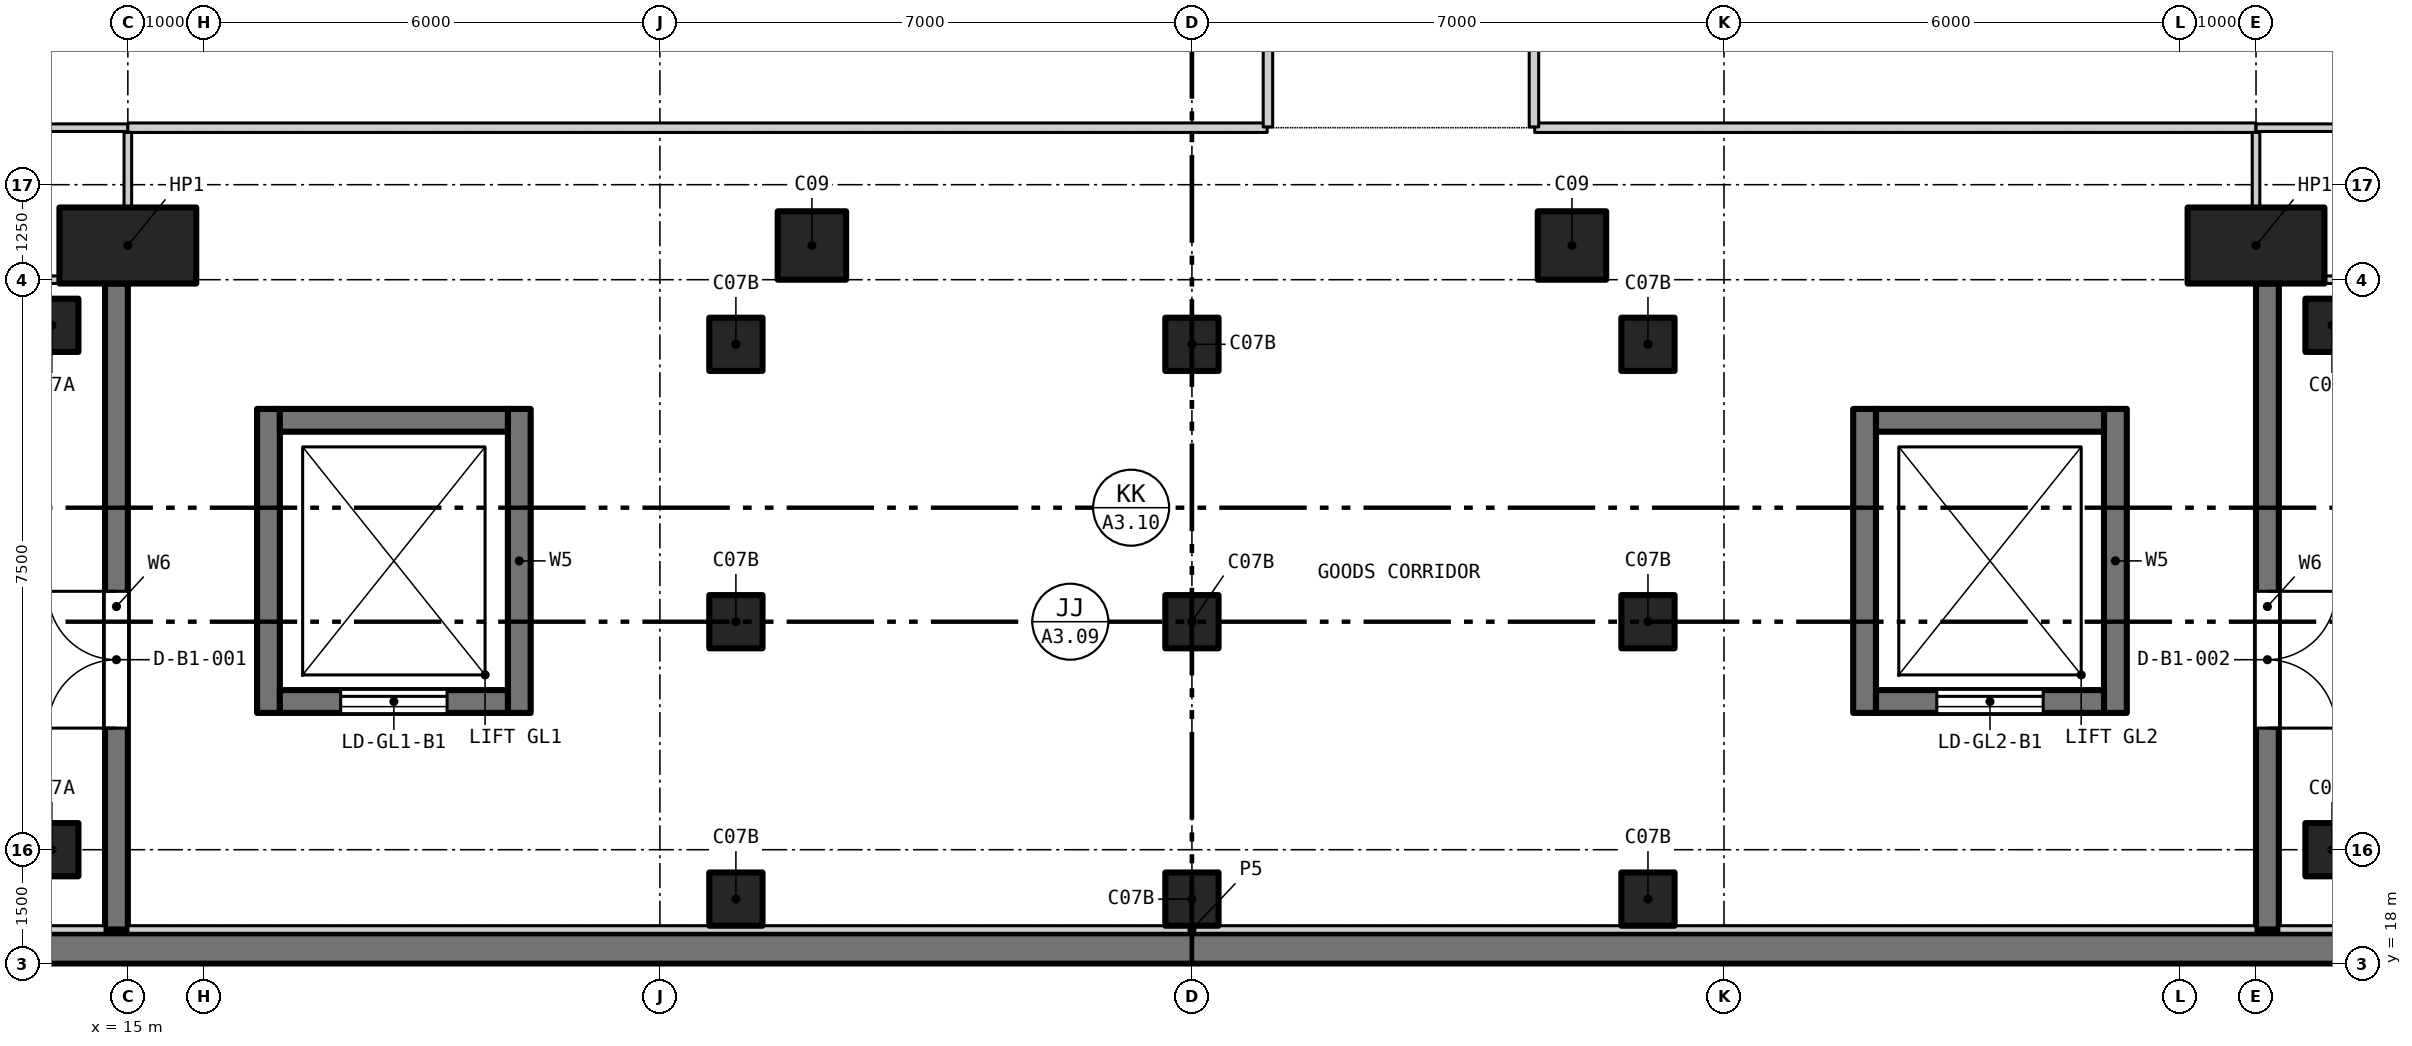
"""IFC4 building model, lengths in metres.
Left out: names, types, materials, properties, quantities, classifications, styles, units other than length and angle.
Written with IfcOpenShell. Run it as: python <this file> out.ifc"""

import sys

from ifc_helpers import new_model, si_unit, direction, frame, frame_2d, origin, origin_2d, place, context, subcontext, project, spatial, rectangle, extrude, element, fill, save


model = new_model("IFC4")
c1 = context("Model", 3, precision=1e-05, world=origin(), true_north=direction((0.0, 1.0)))
c2 = subcontext(c1, "Body", "Model", "MODEL_VIEW")
j1 = project(units=[si_unit("LENGTHUNIT", "METRE"), si_unit("PLANEANGLEUNIT", "RADIAN")], contexts=[c1])
p1 = place(None, origin())
s1 = spatial("IfcSite", under=j1, at=p1, CompositionType="ELEMENT")
p2 = place(p1, origin())
s2 = spatial("IfcBuilding", under=s1, at=p2, CompositionType="ELEMENT")
p3 = place(p2, frame((0.0, 0.0, -10.0)))
s3 = spatial("IfcBuildingStorey", under=s2, at=p3, CompositionType="ELEMENT", Elevation=-10.0)
for number, where, z_axis, x_axis in (
    (1, (24.0, 27.45, -1.4), (0.0, 0.0, 1.0), (1.0, 0.0, 0.0)),
    (2, (34.0, 27.45, -1.4), (0.0, 0.0, 1.0), (1.0, 0.0, 0.0)),
):
    element("IfcColumn", number, at=place(p3, frame(where, z_axis=z_axis, x_axis=x_axis)), inside=s3, PredefinedType="COLUMN", context=c2, shape_type="SweptSolid", body=[
        extrude(rectangle(XDim=0.9, YDim=0.9, at=origin_2d()), origin(), (0.0, 0.0, 1.0), 6.4),
    ])
for number, where, z_axis, x_axis in (
    (3, (14.0, 19.5, -1.4), (0.0, 0.0, 1.0), (1.0, 0.0, 0.0)),
    (4, (14.0, 26.4, -1.4), (0.0, 0.0, 1.0), (1.0, 0.0, 0.0)),
    (5, (44.0, 19.5, -1.4), (0.0, 0.0, 1.0), (1.0, 0.0, 0.0)),
    (6, (44.0, 26.4, -1.4), (0.0, 0.0, 1.0), (1.0, 0.0, 0.0)),
    (7, (23.0, 22.5, -1.4), (0.0, 0.0, 1.0), (1.0, 0.0, 0.0)),
    (8, (29.0, 22.5, -1.4), (0.0, 0.0, 1.0), (1.0, 0.0, 0.0)),
    (9, (35.0, 22.5, -1.4), (0.0, 0.0, 1.0), (1.0, 0.0, 0.0)),
    (10, (23.0, 26.15, -1.4), (0.0, 0.0, 1.0), (1.0, 0.0, 0.0)),
    (11, (29.0, 26.15, -1.4), (0.0, 0.0, 1.0), (1.0, 0.0, 0.0)),
    (12, (35.0, 26.15, -1.4), (0.0, 0.0, 1.0), (1.0, 0.0, 0.0)),
    (13, (23.0, 18.85, -1.4), (0.0, 0.0, 1.0), (1.0, 0.0, 0.0)),
    (14, (29.0, 18.85, -1.4), (0.0, 0.0, 1.0), (1.0, 0.0, 0.0)),
    (15, (35.0, 18.85, -1.4), (0.0, 0.0, 1.0), (1.0, 0.0, 0.0)),
):
    element("IfcColumn", number, at=place(p3, frame(where, z_axis=z_axis, x_axis=x_axis)), inside=s3, PredefinedType="COLUMN", context=c2, shape_type="SweptSolid", body=[
        extrude(rectangle(XDim=0.7, YDim=0.7, at=origin_2d()), origin(), (0.0, 0.0, 1.0), 6.4),
    ])
p4 = place(p3, frame((0.4, 18.2, -1.4), z_axis=(0.0, 0.0, 1.0), x_axis=(1.0, 0.0, 0.0)))
e16 = element("IfcWall", 16, at=p4, inside=s3, PredefinedType="SOLIDWALL", context=c2, shape_type="SweptSolid", body=[
    extrude(rectangle(XDim=57.2, YDim=0.4, at=frame_2d((28.6, 0.0))), origin(), (0.0, 0.0, 1.0), 6.4),
])
p5 = place(p3, frame((14.85, 18.45, -1.4), z_axis=(0.0, 0.0, 1.0), x_axis=(0.0, 1.0, 0.0)))
e17 = element("IfcWall", 17, at=p5, inside=s3, PredefinedType="SOLIDWALL", context=c2, shape_type="SweptSolid", body=[
    extrude(rectangle(XDim=8.5, YDim=0.3, at=frame_2d((4.25, 0.0))), origin(), (0.0, 0.0, 1.0), 6.4),
])
p6 = place(p5, frame((2.65, 0.0, 1.4)))
e18 = element("IfcOpeningElement", 18, at=p6, cuts=e17, PredefinedType="OPENING", context=c2, shape_type="SweptSolid", body=[
    extrude(rectangle(XDim=1.8, YDim=2.1, at=frame_2d((0.9, 1.05))), frame((0.0, 0.16, 0.0), z_axis=(0.0, -1.0, 0.0), x_axis=(1.0, 0.0, 0.0)), (0.0, 0.0, 1.0), 0.32),
])
p7 = place(p3, frame((43.15, 18.45, -1.4), z_axis=(0.0, 0.0, 1.0), x_axis=(0.0, 1.0, 0.0)))
e19 = element("IfcWall", 19, at=p7, inside=s3, PredefinedType="SOLIDWALL", context=c2, shape_type="SweptSolid", body=[
    extrude(rectangle(XDim=8.5, YDim=0.3, at=frame_2d((4.25, 0.0))), origin(), (0.0, 0.0, 1.0), 6.4),
])
p8 = place(p7, frame((2.65, 0.0, 1.4)))
e20 = element("IfcOpeningElement", 20, at=p8, cuts=e19, PredefinedType="OPENING", context=c2, shape_type="SweptSolid", body=[
    extrude(rectangle(XDim=1.8, YDim=2.1, at=frame_2d((0.9, 1.05))), frame((0.0, 0.16, 0.0), z_axis=(0.0, -1.0, 0.0), x_axis=(1.0, 0.0, 0.0)), (0.0, 0.0, 1.0), 0.32),
])
for number, where, z_axis, x_axis in (
    (21, (16.85, 21.3, -1.4), (0.0, 0.0, 1.0), (0.0, 1.0, 0.0)),
    (22, (20.15, 21.3, -1.4), (0.0, 0.0, 1.0), (0.0, 1.0, 0.0)),
):
    element("IfcWall", number, at=place(p3, frame(where, z_axis=z_axis, x_axis=x_axis)), inside=s3, PredefinedType="SHEAR", context=c2, shape_type="SweptSolid", body=[
        extrude(rectangle(XDim=4.0, YDim=0.3, at=frame_2d((2.0, 0.0))), origin(), (0.0, 0.0, 1.0), 6.4),
    ])
p9 = place(p3, frame((17.0, 21.45, -1.4), z_axis=(0.0, 0.0, 1.0), x_axis=(1.0, 0.0, 0.0)))
e23 = element("IfcWall", 23, at=p9, inside=s3, PredefinedType="SHEAR", context=c2, shape_type="SweptSolid", body=[
    extrude(rectangle(XDim=3.0, YDim=0.3, at=frame_2d((1.5, 0.0))), origin(), (0.0, 0.0, 1.0), 6.4),
])
p10 = place(p9, frame((0.8, 0.0, 1.4)))
e24 = element("IfcOpeningElement", 24, at=p10, cuts=e23, PredefinedType="OPENING", context=c2, shape_type="SweptSolid", body=[
    extrude(rectangle(XDim=1.4, YDim=2.1, at=frame_2d((0.7, 1.05))), frame((0.0, 0.16, 0.0), z_axis=(0.0, -1.0, 0.0), x_axis=(1.0, 0.0, 0.0)), (0.0, 0.0, 1.0), 0.32),
])
p11 = place(p3, frame((17.0, 25.15, -1.4), z_axis=(0.0, 0.0, 1.0), x_axis=(1.0, 0.0, 0.0)))
e25 = element("IfcWall", 25, at=p11, inside=s3, PredefinedType="SHEAR", context=c2, shape_type="SweptSolid", body=[
    extrude(rectangle(XDim=3.0, YDim=0.3, at=frame_2d((1.5, 0.0))), origin(), (0.0, 0.0, 1.0), 6.4),
])
for number, where, z_axis, x_axis in (
    (26, (37.85, 21.3, -1.4), (0.0, 0.0, 1.0), (0.0, 1.0, 0.0)),
    (27, (41.15, 21.3, -1.4), (0.0, 0.0, 1.0), (0.0, 1.0, 0.0)),
):
    element("IfcWall", number, at=place(p3, frame(where, z_axis=z_axis, x_axis=x_axis)), inside=s3, PredefinedType="SHEAR", context=c2, shape_type="SweptSolid", body=[
        extrude(rectangle(XDim=4.0, YDim=0.3, at=frame_2d((2.0, 0.0))), origin(), (0.0, 0.0, 1.0), 6.4),
    ])
p12 = place(p3, frame((38.0, 21.45, -1.4), z_axis=(0.0, 0.0, 1.0), x_axis=(1.0, 0.0, 0.0)))
e28 = element("IfcWall", 28, at=p12, inside=s3, PredefinedType="SHEAR", context=c2, shape_type="SweptSolid", body=[
    extrude(rectangle(XDim=3.0, YDim=0.3, at=frame_2d((1.5, 0.0))), origin(), (0.0, 0.0, 1.0), 6.4),
])
p13 = place(p12, frame((0.8, 0.0, 1.4)))
e29 = element("IfcOpeningElement", 29, at=p13, cuts=e28, PredefinedType="OPENING", context=c2, shape_type="SweptSolid", body=[
    extrude(rectangle(XDim=1.4, YDim=2.1, at=frame_2d((0.7, 1.05))), frame((0.0, 0.16, 0.0), z_axis=(0.0, -1.0, 0.0), x_axis=(1.0, 0.0, 0.0)), (0.0, 0.0, 1.0), 0.32),
])
p14 = place(p3, frame((38.0, 25.15, -1.4), z_axis=(0.0, 0.0, 1.0), x_axis=(1.0, 0.0, 0.0)))
e30 = element("IfcWall", 30, at=p14, inside=s3, PredefinedType="SHEAR", context=c2, shape_type="SweptSolid", body=[
    extrude(rectangle(XDim=3.0, YDim=0.3, at=frame_2d((1.5, 0.0))), origin(), (0.0, 0.0, 1.0), 6.4),
])
for number, where, z_axis, x_axis in (
    (31, (15.0, 27.45, -1.4), (0.0, 0.0, 1.0), (1.0, 0.0, 0.0)),
    (32, (43.0, 27.45, -1.4), (0.0, 0.0, 1.0), (1.0, 0.0, 0.0)),
):
    element("IfcColumn", number, at=place(p3, frame(where, z_axis=z_axis, x_axis=x_axis)), inside=s3, PredefinedType="COLUMN", context=c2, shape_type="SweptSolid", body=[
        extrude(rectangle(XDim=1.8, YDim=1.0, at=origin_2d()), origin(), (0.0, 0.0, 1.0), 6.4),
    ])
p15 = place(p3, frame((6.61, 18.45, 0.0), z_axis=(0.0, 0.0, 1.0), x_axis=(1.0, 0.0, 0.0)))
e33 = element("IfcWall", 33, at=p15, inside=s3, PredefinedType="PARTITIONING", context=c2, shape_type="SweptSolid", body=[
    extrude(rectangle(XDim=8.09, YDim=0.1, at=frame_2d((4.045, 0.0))), origin(), (0.0, 0.0, 1.0), 4.75),
])
p16 = place(p3, frame((15.0, 18.45, 0.0), z_axis=(0.0, 0.0, 1.0), x_axis=(1.0, 0.0, 0.0)))
e34 = element("IfcWall", 34, at=p16, inside=s3, PredefinedType="PARTITIONING", context=c2, shape_type="SweptSolid", body=[
    extrude(rectangle(XDim=28.0, YDim=0.1, at=frame_2d((14.0, 0.0))), origin(), (0.0, 0.0, 1.0), 4.75),
])
p17 = place(p3, frame((43.3, 18.45, 0.0), z_axis=(0.0, 0.0, 1.0), x_axis=(1.0, 0.0, 0.0)))
e35 = element("IfcWall", 35, at=p17, inside=s3, PredefinedType="PARTITIONING", context=c2, shape_type="SweptSolid", body=[
    extrude(rectangle(XDim=8.11, YDim=0.1, at=frame_2d((4.055, 0.0))), origin(), (0.0, 0.0, 1.0), 4.75),
])
for number, where, z_axis, x_axis in (
    (36, (12.65, 27.0, 0.0), (0.0, 0.0, 1.0), (1.0, 0.0, 0.0)),
    (37, (43.9, 27.0, 0.0), (0.0, 0.0, 1.0), (1.0, 0.0, 0.0)),
):
    element("IfcWall", number, at=place(p3, frame(where, z_axis=z_axis, x_axis=x_axis)), inside=s3, PredefinedType="PARTITIONING", context=c2, shape_type="SweptSolid", body=[
        extrude(rectangle(XDim=1.45, YDim=0.1, at=frame_2d((0.725, 0.0))), origin(), (0.0, 0.0, 1.0), 4.75),
    ])
p18 = place(p3, frame((12.712, 29.0, 0.0), z_axis=(0.0, 0.0, 1.0), x_axis=(1.0, 0.0, 0.0)))
e38 = element("IfcWall", 38, at=p18, inside=s3, PredefinedType="PARTITIONING", context=c2, shape_type="SweptSolid", body=[
    extrude(rectangle(XDim=2.288, YDim=0.1, at=frame_2d((1.144, 0.0))), origin(), (0.0, 0.0, 1.0), 4.75),
])
p19 = place(p3, frame((15.0, 29.0, 0.0), z_axis=(0.0, 0.0, 1.0), x_axis=(1.0, 0.0, 0.0)))
e39 = element("IfcWall", 39, at=p19, inside=s3, PredefinedType="PARTITIONING", context=c2, shape_type="SweptSolid", body=[
    extrude(rectangle(XDim=14.99, YDim=0.125, at=frame_2d((7.495, 0.0))), origin(), (0.0, 0.0, 1.0), 4.75),
])
p20 = place(p3, frame((33.51, 29.0, 0.0), z_axis=(0.0, 0.0, 1.0), x_axis=(1.0, 0.0, 0.0)))
e40 = element("IfcWall", 40, at=p20, inside=s3, PredefinedType="PARTITIONING", context=c2, shape_type="SweptSolid", body=[
    extrude(rectangle(XDim=9.49, YDim=0.125, at=frame_2d((4.745, 0.0))), origin(), (0.0, 0.0, 1.0), 4.75),
])
p21 = place(p3, frame((43.0, 29.0, 0.0), z_axis=(0.0, 0.0, 1.0), x_axis=(1.0, 0.0, 0.0)))
e41 = element("IfcWall", 41, at=p21, inside=s3, PredefinedType="PARTITIONING", context=c2, shape_type="SweptSolid", body=[
    extrude(rectangle(XDim=2.288, YDim=0.1, at=frame_2d((1.144, 0.0))), origin(), (0.0, 0.0, 1.0), 4.75),
])
p22 = place(p3, frame((15.0, 27.95, 0.0), z_axis=(0.0, 0.0, 1.0), x_axis=(0.0, 1.0, 0.0)))
e42 = element("IfcWall", 42, at=p22, inside=s3, PredefinedType="PARTITIONING", context=c2, shape_type="SweptSolid", body=[
    extrude(rectangle(XDim=0.988, YDim=0.1, at=frame_2d((0.494, 0.0))), origin(), (0.0, 0.0, 1.0), 4.75),
])
p23 = place(p3, frame((30.0, 29.01, 0.0), z_axis=(0.0, 0.0, 1.0), x_axis=(0.0, 1.0, 0.0)))
e43 = element("IfcWall", 43, at=p23, inside=s3, PredefinedType="PARTITIONING", context=c2, shape_type="SweptSolid", body=[
    extrude(rectangle(XDim=20.49, YDim=0.125, at=frame_2d((10.245, 0.0))), origin(), (0.0, 0.0, 1.0), 4.75),
])
p24 = place(p23, frame((9.65, 0.0, 0.0)))
e44 = element("IfcOpeningElement", 44, at=p24, cuts=e43, PredefinedType="OPENING", context=c2, shape_type="SweptSolid", body=[
    extrude(rectangle(XDim=1.2, YDim=2.1, at=frame_2d((0.6, 1.05))), frame((0.0, 0.073, 0.0), z_axis=(0.0, -1.0, 0.0), x_axis=(1.0, 0.0, 0.0)), (0.0, 0.0, 1.0), 0.145),
])
p25 = place(p3, frame((33.5, 29.01, 0.0), z_axis=(0.0, 0.0, 1.0), x_axis=(0.0, 1.0, 0.0)))
e45 = element("IfcWall", 45, at=p25, inside=s3, PredefinedType="PARTITIONING", context=c2, shape_type="SweptSolid", body=[
    extrude(rectangle(XDim=20.49, YDim=0.125, at=frame_2d((10.245, 0.0))), origin(), (0.0, 0.0, 1.0), 4.75),
])
p26 = place(p25, frame((9.65, 0.0, 0.0)))
e46 = element("IfcOpeningElement", 46, at=p26, cuts=e45, PredefinedType="OPENING", context=c2, shape_type="SweptSolid", body=[
    extrude(rectangle(XDim=1.2, YDim=2.1, at=frame_2d((0.6, 1.05))), frame((0.0, 0.073, 0.0), z_axis=(0.0, -1.0, 0.0), x_axis=(1.0, 0.0, 0.0)), (0.0, 0.0, 1.0), 0.145),
])
p27 = place(p3, frame((43.0, 27.95, 0.0), z_axis=(0.0, 0.0, 1.0), x_axis=(0.0, 1.0, 0.0)))
e47 = element("IfcWall", 47, at=p27, inside=s3, PredefinedType="PARTITIONING", context=c2, shape_type="SweptSolid", body=[
    extrude(rectangle(XDim=0.988, YDim=0.1, at=frame_2d((0.494, 0.0))), origin(), (0.0, 0.0, 1.0), 4.75),
])
p28 = place(p6, origin())
e48 = element("IfcDoor", 48, at=p28, inside=s3, OperationType="DOUBLE_DOOR_SINGLE_SWING", PredefinedType="DOOR", context=c2, shape_type="SweptSolid", body=[
    extrude(rectangle(XDim=1.8, YDim=2.1, at=frame_2d((0.9, 1.05))), frame((0.0, 0.025, 0.0), z_axis=(0.0, -1.0, 0.0), x_axis=(1.0, 0.0, 0.0)), (0.0, 0.0, 1.0), 0.05),
])
fill(e18, e48)
p29 = place(p8, frame((1.8, 0.0, 0.0), z_axis=(0.0, 0.0, 1.0), x_axis=(-1.0, 0.0, 0.0)))
e49 = element("IfcDoor", 49, at=p29, inside=s3, OperationType="DOUBLE_DOOR_SINGLE_SWING", PredefinedType="DOOR", context=c2, shape_type="SweptSolid", body=[
    extrude(rectangle(XDim=1.8, YDim=2.1, at=frame_2d((0.9, 1.05))), frame((0.0, 0.025, 0.0), z_axis=(0.0, -1.0, 0.0), x_axis=(1.0, 0.0, 0.0)), (0.0, 0.0, 1.0), 0.05),
])
fill(e20, e49)
p30 = place(p10, origin())
e50 = element("IfcDoor", 50, at=p30, inside=s3, OperationType="DOUBLE_DOOR_SLIDING", PredefinedType="DOOR", context=c2, shape_type="SweptSolid", body=[
    extrude(rectangle(XDim=1.4, YDim=2.1, at=frame_2d((0.7, 1.05))), frame((0.0, 0.025, 0.0), z_axis=(0.0, -1.0, 0.0), x_axis=(1.0, 0.0, 0.0)), (0.0, 0.0, 1.0), 0.05),
])
fill(e24, e50)
p31 = place(p13, origin())
e51 = element("IfcDoor", 51, at=p31, inside=s3, OperationType="DOUBLE_DOOR_SLIDING", PredefinedType="DOOR", context=c2, shape_type="SweptSolid", body=[
    extrude(rectangle(XDim=1.4, YDim=2.1, at=frame_2d((0.7, 1.05))), frame((0.0, 0.025, 0.0), z_axis=(0.0, -1.0, 0.0), x_axis=(1.0, 0.0, 0.0)), (0.0, 0.0, 1.0), 0.05),
])
fill(e29, e51)
save(model, sys.argv[1])
